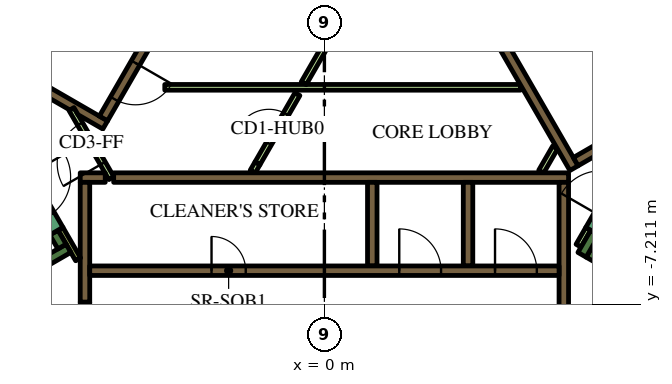
"""IFC4 building model, lengths in metres.
Left out: names, types, materials, properties, quantities, classifications, styles, units other than length and angle.
Written with IfcOpenShell. Run it as: python <this file> out.ifc"""

import sys

from ifc_helpers import new_model, si_unit, direction, frame, frame_2d, origin, place, context, subcontext, project, spatial, polyline, rectangle, outline, extrude, element, fill, save


model = new_model("IFC4")
c1 = context("Model", 3, precision=1e-05, world=origin(), true_north=direction((0.0, 1.0)))
c2 = subcontext(c1, "Body", "Model", "MODEL_VIEW")
j1 = project(units=[si_unit("LENGTHUNIT", "METRE"), si_unit("PLANEANGLEUNIT", "RADIAN")], contexts=[c1])
p1 = place(None, origin())
s1 = spatial("IfcSite", under=j1, at=p1, CompositionType="ELEMENT")
p2 = place(p1, origin())
s2 = spatial("IfcBuilding", under=s1, at=p2, CompositionType="ELEMENT")
p3 = place(p2, frame((0.0, 0.0, 27.6)))
s3 = spatial("IfcBuildingStorey", under=s2, at=p3, CompositionType="ELEMENT", Elevation=27.6)
p4 = place(p3, frame((6.776, 13.364, 0.0), z_axis=(0.0, 0.0, 1.0), x_axis=(0.500004177138, -0.8660229921, 0.0)))
e1 = element("IfcWall", 1, at=p4, inside=s3, PredefinedType="SOLIDWALL", context=c2, shape_type="SweptSolid", body=[
    extrude(rectangle(XDim=20.204, YDim=0.9, at=frame_2d((10.102, 0.0))), origin(), (0.0, 0.0, 1.0), 3.9),
])
p5 = place(p3, frame((-15.36, -1.503, 0.0), z_axis=(0.0, 0.0, 1.0), x_axis=(0.50000389221, 0.866023156604, 0.0)))
e2 = element("IfcWall", 2, at=p5, inside=s3, PredefinedType="SOLIDWALL", context=c2, shape_type="SweptSolid", body=[
    extrude(rectangle(XDim=21.0, YDim=0.9, at=frame_2d((10.5, 0.0))), origin(), (0.0, 0.0, 1.0), 3.9),
])
p6 = place(p3, frame((12.84, -9.261, 0.0), z_axis=(0.0, 0.0, 1.0), x_axis=(-0.866013990052, 0.500019768644, 0.0)))
e3 = element("IfcWall", 3, at=p6, inside=s3, PredefinedType="SOLIDWALL", context=c2, shape_type="SweptSolid", body=[
    extrude(rectangle(XDim=6.8, YDim=0.25, at=frame_2d((3.4, 0.0))), origin(), (0.0, 0.0, 1.0), 3.9),
])
p7 = place(p3, frame((6.78, -5.906, 0.0), z_axis=(0.0, 0.0, 1.0), x_axis=(0.500223362819, 0.865896406789, 0.0)))
e4 = element("IfcWall", 4, at=p7, inside=s3, PredefinedType="SOLIDWALL", context=c2, shape_type="SweptSolid", body=[
    extrude(rectangle(XDim=0.675, YDim=0.25, at=frame_2d((0.337, 0.0))), origin(), (0.0, 0.0, 1.0), 3.9),
])
p8 = place(p3, frame((-12.84, -9.261, 0.0), z_axis=(0.0, 0.0, 1.0), x_axis=(0.866016039709, 0.500016218704, 0.0)))
e5 = element("IfcWall", 5, at=p8, inside=s3, PredefinedType="SOLIDWALL", context=c2, shape_type="SweptSolid", body=[
    extrude(rectangle(XDim=7.05, YDim=0.25, at=frame_2d((3.525, 0.0))), origin(), (0.0, 0.0, 1.0), 3.9),
])
p9 = place(p3, frame((-6.905, -5.69, 0.0), z_axis=(0.0, 0.0, 1.0), x_axis=(-0.500402024738, 0.865793170242, 0.0)))
e6 = element("IfcWall", 6, at=p9, inside=s3, PredefinedType="SOLIDWALL", context=c2, shape_type="SweptSolid", body=[
    extrude(rectangle(XDim=0.425, YDim=0.25, at=frame_2d((0.212, 0.0))), origin(), (0.0, 0.0, 1.0), 3.9),
])
p10 = place(p3, frame((-5.545, -3.875, 0.0), z_axis=(0.0, 0.0, 1.0), x_axis=(1.0, 0.0, 0.0)))
e7 = element("IfcWall", 7, at=p10, inside=s3, PredefinedType="SOLIDWALL", context=c2, shape_type="SweptSolid", body=[
    extrude(rectangle(XDim=11.97, YDim=0.25, at=frame_2d((5.985, 0.0))), origin(), (0.0, 0.0, 1.0), 3.9),
])
p11 = place(p3, frame((-6.425, -3.875, 0.0), z_axis=(0.0, 0.0, 1.0), x_axis=(1.0, 0.0, 0.0)))
e8 = element("IfcWall", 8, at=p11, inside=s3, PredefinedType="SOLIDWALL", context=c2, shape_type="SweptSolid", body=[
    extrude(rectangle(XDim=0.658, YDim=0.25, at=frame_2d((0.329, 0.0))), origin(), (0.0, 0.0, 1.0), 3.9),
])
p12 = place(p3, frame((6.3, -7.268, 0.0), z_axis=(0.0, 0.0, 1.0), x_axis=(0.0, 1.0, 0.0)))
e9 = element("IfcWall", 9, at=p12, inside=s3, PredefinedType="SOLIDWALL", context=c2, shape_type="SweptSolid", body=[
    extrude(rectangle(XDim=3.268, YDim=0.25, at=frame_2d((1.634, 0.0))), origin(), (0.0, 0.0, 1.0), 3.9),
])
for number, where, z_axis, x_axis in (
    (10, (3.78, -4.0, 0.0), (0.0, 0.0, 1.0), (0.0, -1.0, 0.0)),
    (11, (1.26, -4.0, 0.0), (0.0, 0.0, 1.0), (0.0, -1.0, 0.0)),
):
    element("IfcWall", number, at=place(p3, frame(where, z_axis=z_axis, x_axis=x_axis)), inside=s3, PredefinedType="SOLIDWALL", context=c2, shape_type="SweptSolid", body=[
        extrude(rectangle(XDim=2.2, YDim=0.25, at=frame_2d((1.1, 0.0))), origin(), (0.0, 0.0, 1.0), 3.9),
    ])
p13 = place(p3, frame((-6.3, -4.0, 0.0), z_axis=(0.0, 0.0, 1.0), x_axis=(0.0, -1.0, 0.0)))
e12 = element("IfcWall", 12, at=p13, inside=s3, PredefinedType="SOLIDWALL", context=c2, shape_type="SweptSolid", body=[
    extrude(rectangle(XDim=3.154, YDim=0.25, at=frame_2d((1.577, 0.0))), origin(), (0.0, 0.0, 1.0), 3.9),
])
p14 = place(p3, origin())
e13 = element("IfcWall", 13, at=p14, inside=s3, PredefinedType="SOLIDWALL", context=c2, shape_type="SweptSolid", body=[
    extrude(outline(polyline([(0.566, 6.725), (0.566, 6.875), (0.566, 6.875), (0.565, 6.875), (0.361, 6.875), (0.035, 7.439), (0.252, 7.564), (0.377, 7.348), (6.552, -3.348), (6.677, -3.564), (6.46, -3.689), (0.448, 6.725), (0.565, 6.725), (0.566, 6.725), (0.566, 6.725)])), origin(), (0.0, 0.0, 1.0), 3.9),
])
p15 = place(p3, frame((6.614, -3.456, 0.0), z_axis=(0.0, 0.0, 1.0), x_axis=(0.866031582473, 0.499989298045, 0.0)))
e14 = element("IfcWall", 14, at=p15, inside=s3, PredefinedType="SOLIDWALL", context=c2, shape_type="SweptSolid", body=[
    extrude(rectangle(XDim=2.455, YDim=0.25, at=frame_2d((1.228, 0.0))), origin(), (0.0, 0.0, 1.0), 3.9),
])
p16 = place(p3, frame((-8.06, -1.311, 0.0), z_axis=(0.0, 0.0, 1.0), x_axis=(0.50000273126, 0.866023826885, 0.0)))
e15 = element("IfcWall", 15, at=p16, inside=s3, PredefinedType="SOLIDWALL", context=c2, shape_type="SweptSolid", body=[
    extrude(rectangle(XDim=10.33, YDim=0.25, at=frame_2d((5.165, 0.0))), origin(), (0.0, 0.0, 1.0), 3.9),
])
e16 = element("IfcWall", 16, at=p14, inside=s3, PredefinedType="SOLIDWALL", context=c2, shape_type="SweptSolid", body=[
    extrude(outline(polyline([(-5.922, -2.257), (-5.922, -2.257), (-5.705, -2.382), (-5.83, -2.598), (-6.483, -2.221), (-6.591, -2.033), (-6.591, -2.033), (-6.7, -2.096), (-7.952, -1.373), (-7.827, -1.156), (-5.922, -2.257)])), origin(), (0.0, 0.0, 1.0), 3.9),
])
p17 = place(p3, frame((-6.48, -6.027, 0.0), z_axis=(0.0, 0.0, 1.0), x_axis=(-0.499927229454, 0.866067413802, 0.0)))
e17 = element("IfcWall", 17, at=p17, inside=s3, PredefinedType="PARTITIONING", context=c2, shape_type="SweptSolid", body=[
    extrude(rectangle(XDim=0.929, YDim=0.15, at=frame_2d((0.464, 0.0))), origin(), (0.0, 0.0, 1.0), 3.9),
])
p18 = place(p3, frame((-1.887, -3.718, 0.0), z_axis=(0.0, 0.0, 1.0), x_axis=(0.500165633897, 0.865929753888, 0.0)))
e18 = element("IfcWall", 18, at=p18, inside=s3, PredefinedType="PARTITIONING", context=c2, shape_type="SweptSolid", body=[
    extrude(rectangle(XDim=0.254, YDim=0.15, at=frame_2d((0.127, 0.0))), origin(), (0.0, 0.0, 1.0), 2.75),
])
p19 = place(p3, frame((6.945, -5.222, 0.0), z_axis=(0.0, 0.0, 1.0), x_axis=(-0.499818422106, -0.866130212453, 0.0)))
e19 = element("IfcWall", 19, at=p19, inside=s3, PredefinedType="PARTITIONING", context=c2, shape_type="SweptSolid", body=[
    extrude(rectangle(XDim=0.514, YDim=0.15, at=frame_2d((0.257, 0.0))), origin(), (0.0, 0.0, 1.0), 2.75),
])
p20 = place(p3, frame((5.705, -3.718, 0.0), z_axis=(0.0, 0.0, 1.0), x_axis=(0.499962090823, 0.866047289552, 0.0)))
e20 = element("IfcWall", 20, at=p20, inside=s3, PredefinedType="PARTITIONING", context=c2, shape_type="SweptSolid", body=[
    extrude(rectangle(XDim=0.735, YDim=0.15, at=frame_2d((0.367, 0.0))), origin(), (0.0, 0.0, 1.0), 2.75),
])
p21 = place(p3, frame((-4.2, -1.5, 0.0), z_axis=(0.0, 0.0, 1.0), x_axis=(1.0, 0.0, 0.0)))
e21 = element("IfcWall", 21, at=p21, inside=s3, PredefinedType="PARTITIONING", context=c2, shape_type="SweptSolid", body=[
    extrude(rectangle(XDim=9.359, YDim=0.15, at=frame_2d((4.68, 0.0))), origin(), (0.0, 0.0, 1.0), 2.75),
])
p22 = place(p3, frame((-0.544, -1.393, 0.0), z_axis=(0.0, 0.0, 1.0), x_axis=(0.499928740635, 0.866066541489, 0.0)))
e22 = element("IfcWall", 22, at=p22, inside=s3, PredefinedType="PARTITIONING", context=c2, shape_type="SweptSolid", body=[
    extrude(rectangle(XDim=1.912, YDim=0.15, at=frame_2d((0.956, 0.0))), origin(), (0.0, 0.0, 1.0), 2.75),
])
p23 = place(p3, frame((-6.175, -6.325, 0.0), z_axis=(0.0, 0.0, 1.0), x_axis=(1.0, 0.0, 0.0)))
e23 = element("IfcWall", 23, at=p23, inside=s3, PredefinedType="SOLIDWALL", context=c2, shape_type="SweptSolid", body=[
    extrude(rectangle(XDim=12.35, YDim=0.25, at=frame_2d((6.175, 0.0))), origin(), (0.0, 0.0, 1.0), 3.9),
])
p24 = place(p23, frame((3.205, 0.0, 0.0)))
e24 = element("IfcOpeningElement", 24, at=p24, cuts=e23, PredefinedType="OPENING", context=c2, shape_type="SweptSolid", body=[
    extrude(rectangle(XDim=0.9, YDim=2.1, at=frame_2d((0.45, 1.05))), frame((0.0, 0.135, 0.0), z_axis=(0.0, -1.0, 0.0), x_axis=(1.0, 0.0, 0.0)), (0.0, 0.0, 1.0), 0.27),
])
p25 = place(p23, frame((8.145, 0.0, 0.0)))
e25 = element("IfcOpeningElement", 25, at=p25, cuts=e23, PredefinedType="OPENING", context=c2, shape_type="SweptSolid", body=[
    extrude(rectangle(XDim=1.1, YDim=2.1, at=frame_2d((0.55, 1.05))), frame((0.0, 0.135, 0.0), z_axis=(0.0, -1.0, 0.0), x_axis=(1.0, 0.0, 0.0)), (0.0, 0.0, 1.0), 0.27),
])
p26 = place(p23, frame((10.665, 0.0, 0.0)))
e26 = element("IfcOpeningElement", 26, at=p26, cuts=e23, PredefinedType="OPENING", context=c2, shape_type="SweptSolid", body=[
    extrude(rectangle(XDim=1.1, YDim=2.1, at=frame_2d((0.55, 1.05))), frame((0.0, 0.135, 0.0), z_axis=(0.0, -1.0, 0.0), x_axis=(1.0, 0.0, 0.0)), (0.0, 0.0, 1.0), 0.27),
])
p27 = place(p3, frame((8.565, -2.185, 0.0), z_axis=(0.0, 0.0, 1.0), x_axis=(-0.499997954832, 0.866026584559, 0.0)))
e27 = element("IfcWall", 27, at=p27, inside=s3, PredefinedType="SOLIDWALL", context=c2, shape_type="SweptSolid", body=[
    extrude(rectangle(XDim=12.35, YDim=0.25, at=frame_2d((6.175, 0.0))), origin(), (0.0, 0.0, 1.0), 3.9),
])
p28 = place(p27, frame((5.725, 0.0, 0.0)))
e28 = element("IfcOpeningElement", 28, at=p28, cuts=e27, PredefinedType="OPENING", context=c2, shape_type="SweptSolid", body=[
    extrude(rectangle(XDim=0.9, YDim=2.1, at=frame_2d((0.45, 1.05))), frame((0.0, 0.135, 0.0), z_axis=(0.0, -1.0, 0.0), x_axis=(1.0, 0.0, 0.0)), (0.0, 0.0, 1.0), 0.27),
])
p29 = place(p3, frame((-0.898, 6.194, 0.0), z_axis=(0.0, 0.0, 1.0), x_axis=(-0.499996202215, -0.866027596426, 0.0)))
e29 = element("IfcWall", 29, at=p29, inside=s3, PredefinedType="SOLIDWALL", context=c2, shape_type="SweptSolid", body=[
    extrude(rectangle(XDim=9.83, YDim=0.25, at=frame_2d((4.915, 0.0))), origin(), (0.0, 0.0, 1.0), 3.9),
])
p30 = place(p29, frame((0.585, 0.0, 0.0)))
e30 = element("IfcOpeningElement", 30, at=p30, cuts=e29, PredefinedType="OPENING", context=c2, shape_type="SweptSolid", body=[
    extrude(rectangle(XDim=1.1, YDim=2.1, at=frame_2d((0.55, 1.05))), frame((0.0, 0.135, 0.0), z_axis=(0.0, -1.0, 0.0), x_axis=(1.0, 0.0, 0.0)), (0.0, 0.0, 1.0), 0.27),
])
p31 = place(p29, frame((3.105, 0.0, 0.0)))
e31 = element("IfcOpeningElement", 31, at=p31, cuts=e29, PredefinedType="OPENING", context=c2, shape_type="SweptSolid", body=[
    extrude(rectangle(XDim=1.1, YDim=2.1, at=frame_2d((0.55, 1.05))), frame((0.0, 0.135, 0.0), z_axis=(0.0, -1.0, 0.0), x_axis=(1.0, 0.0, 0.0)), (0.0, 0.0, 1.0), 0.27),
])
p32 = place(p29, frame((5.625, 0.0, 0.0)))
e32 = element("IfcOpeningElement", 32, at=p32, cuts=e29, PredefinedType="OPENING", context=c2, shape_type="SweptSolid", body=[
    extrude(rectangle(XDim=1.1, YDim=2.1, at=frame_2d((0.55, 1.05))), frame((0.0, 0.135, 0.0), z_axis=(0.0, -1.0, 0.0), x_axis=(1.0, 0.0, 0.0)), (0.0, 0.0, 1.0), 0.27),
])
p33 = place(p29, frame((8.145, 0.0, 0.0)))
e33 = element("IfcOpeningElement", 33, at=p33, cuts=e29, PredefinedType="OPENING", context=c2, shape_type="SweptSolid", body=[
    extrude(rectangle(XDim=1.1, YDim=2.1, at=frame_2d((0.55, 1.05))), frame((0.0, 0.135, 0.0), z_axis=(0.0, -1.0, 0.0), x_axis=(1.0, 0.0, 0.0)), (0.0, 0.0, 1.0), 0.27),
])
p34 = place(p3, frame((7.053, -5.284, 0.0), z_axis=(0.0, 0.0, 1.0), x_axis=(0.500078061341, 0.865980330357, 0.0)))
e34 = element("IfcWall", 34, at=p34, inside=s3, PredefinedType="SOLIDWALL", context=c2, shape_type="SweptSolid", body=[
    extrude(rectangle(XDim=2.1, YDim=0.4, at=frame_2d((1.05, 0.0))), origin(), (0.0, 0.0, 1.0), 3.9),
])
p35 = place(p34, frame((0.45, 0.0, 0.0)))
e35 = element("IfcOpeningElement", 35, at=p35, cuts=e34, PredefinedType="OPENING", context=c2, shape_type="SweptSolid", body=[
    extrude(rectangle(XDim=1.2, YDim=2.1, at=frame_2d((0.6, 1.05))), frame((0.0, 0.21, 0.0), z_axis=(0.0, -1.0, 0.0), x_axis=(1.0, 0.0, 0.0)), (0.0, 0.0, 1.0), 0.42),
])
p36 = place(p3, frame((-8.103, -3.466, 0.0), z_axis=(0.0, 0.0, 1.0), x_axis=(0.500078061341, -0.865980330357, 0.0)))
e36 = element("IfcWall", 36, at=p36, inside=s3, PredefinedType="SOLIDWALL", context=c2, shape_type="SweptSolid", body=[
    extrude(rectangle(XDim=2.1, YDim=0.4, at=frame_2d((1.05, 0.0))), origin(), (0.0, 0.0, 1.0), 3.9),
])
p37 = place(p36, frame((0.45, 0.0, 0.0)))
e37 = element("IfcOpeningElement", 37, at=p37, cuts=e36, PredefinedType="OPENING", context=c2, shape_type="SweptSolid", body=[
    extrude(rectangle(XDim=1.2, YDim=2.1, at=frame_2d((0.6, 1.05))), frame((0.0, 0.21, 0.0), z_axis=(0.0, -1.0, 0.0), x_axis=(1.0, 0.0, 0.0)), (0.0, 0.0, 1.0), 0.42),
])
p38 = place(p3, frame((-6.3, -7.154, 0.0), z_axis=(0.0, 0.0, 1.0), x_axis=(0.0, -1.0, 0.0)))
e38 = element("IfcWall", 38, at=p38, inside=s3, PredefinedType="SOLIDWALL", context=c2, shape_type="SweptSolid", body=[
    extrude(rectangle(XDim=1.8, YDim=0.25, at=frame_2d((0.9, 0.0))), origin(), (0.0, 0.0, 1.0), 3.9),
])
p39 = place(p38, frame((0.45, 0.0, 0.0)))
e39 = element("IfcOpeningElement", 39, at=p39, cuts=e38, PredefinedType="OPENING", context=c2, shape_type="SweptSolid", body=[
    extrude(rectangle(XDim=0.9, YDim=2.1, at=frame_2d((0.45, 1.05))), frame((0.0, 0.135, 0.0), z_axis=(0.0, -1.0, 0.0), x_axis=(1.0, 0.0, 0.0)), (0.0, 0.0, 1.0), 0.27),
])
p40 = place(p3, frame((-1.76, -3.498, 0.0), z_axis=(0.0, 0.0, 1.0), x_axis=(0.499977374825, 0.866038466041, 0.0)))
e40 = element("IfcWall", 40, at=p40, inside=s3, PredefinedType="PARTITIONING", context=c2, shape_type="SweptSolid", body=[
    extrude(rectangle(XDim=2.1, YDim=0.15, at=frame_2d((1.05, 0.0))), origin(), (0.0, 0.0, 1.0), 2.75),
])
p41 = place(p40, frame((0.6, 0.0, 0.0)))
e41 = element("IfcOpeningElement", 41, at=p41, cuts=e40, PredefinedType="OPENING", context=c2, shape_type="SweptSolid", body=[
    extrude(rectangle(XDim=0.9, YDim=2.1, at=frame_2d((0.45, 1.05))), frame((0.0, 0.085, 0.0), z_axis=(0.0, -1.0, 0.0), x_axis=(1.0, 0.0, 0.0)), (0.0, 0.0, 1.0), 0.17),
])
p42 = place(p3, frame((-5.606, -3.89, 0.0), z_axis=(0.0, 0.0, 1.0), x_axis=(-0.500027713859, 0.866009402589, 0.0)))
e42 = element("IfcWall", 42, at=p42, inside=s3, PredefinedType="PARTITIONING", context=c2, shape_type="SweptSolid", body=[
    extrude(rectangle(XDim=2.1, YDim=0.15, at=frame_2d((1.05, 0.0))), origin(), (0.0, 0.0, 1.0), 2.75),
])
p43 = place(p42, frame((0.45, 0.0, 0.0)))
e43 = element("IfcOpeningElement", 43, at=p43, cuts=e42, PredefinedType="OPENING", context=c2, shape_type="SweptSolid", body=[
    extrude(rectangle(XDim=1.2, YDim=2.1, at=frame_2d((0.6, 1.05))), frame((0.0, 0.085, 0.0), z_axis=(0.0, -1.0, 0.0), x_axis=(1.0, 0.0, 0.0)), (0.0, 0.0, 1.0), 0.17),
])
p44 = place(p3, frame((6.163, 18.475, 0.0), z_axis=(0.0, 0.0, 1.0), x_axis=(0.500001317485, -0.866024643133, 0.0)))
e44 = element("IfcWall", 44, at=p44, inside=s3, PredefinedType="PARTITIONING", context=c2, shape_type="SweptSolid", body=[
    extrude(rectangle(XDim=25.767, YDim=0.15, at=frame_2d((12.883, 0.0))), origin(), (0.0, 0.0, 1.0), 2.75),
])
p45 = place(p44, frame((24.586, 0.0, 0.0)))
e45 = element("IfcOpeningElement", 45, at=p45, cuts=e44, PredefinedType="OPENING", context=c2, shape_type="SweptSolid", body=[
    extrude(rectangle(XDim=1.0, YDim=2.1, at=frame_2d((0.5, 1.05))), frame((0.0, 0.085, 0.0), z_axis=(0.0, -1.0, 0.0), x_axis=(1.0, 0.0, 0.0)), (0.0, 0.0, 1.0), 0.17),
])
p46 = place(p44, frame((19.319, 0.0, 0.0)))
e46 = element("IfcOpeningElement", 46, at=p46, cuts=e44, PredefinedType="OPENING", context=c2, shape_type="SweptSolid", body=[
    extrude(rectangle(XDim=1.0, YDim=2.1, at=frame_2d((0.5, 1.05))), frame((0.0, 0.085, 0.0), z_axis=(0.0, -1.0, 0.0), x_axis=(1.0, 0.0, 0.0)), (0.0, 0.0, 1.0), 0.17),
])
p47 = place(p44, frame((18.012, 0.0, 0.0)))
e47 = element("IfcOpeningElement", 47, at=p47, cuts=e44, PredefinedType="OPENING", context=c2, shape_type="SweptSolid", body=[
    extrude(rectangle(XDim=1.0, YDim=2.1, at=frame_2d((0.5, 1.05))), frame((0.0, 0.085, 0.0), z_axis=(0.0, -1.0, 0.0), x_axis=(1.0, 0.0, 0.0)), (0.0, 0.0, 1.0), 0.17),
])
p48 = place(p44, frame((6.824, 0.0, 0.0)))
e48 = element("IfcOpeningElement", 48, at=p48, cuts=e44, PredefinedType="OPENING", context=c2, shape_type="SweptSolid", body=[
    extrude(rectangle(XDim=1.1, YDim=2.1, at=frame_2d((0.55, 1.05))), frame((0.0, 0.085, 0.0), z_axis=(0.0, -1.0, 0.0), x_axis=(1.0, 0.0, 0.0)), (0.0, 0.0, 1.0), 0.17),
])
p49 = place(p44, frame((4.658, 0.0, 0.0)))
e49 = element("IfcOpeningElement", 49, at=p49, cuts=e44, PredefinedType="OPENING", context=c2, shape_type="SweptSolid", body=[
    extrude(rectangle(XDim=0.9, YDim=2.1, at=frame_2d((0.45, 1.05))), frame((0.0, 0.085, 0.0), z_axis=(0.0, -1.0, 0.0), x_axis=(1.0, 0.0, 0.0)), (0.0, 0.0, 1.0), 0.17),
])
p50 = place(p44, frame((0.18, 0.0, 0.0)))
e50 = element("IfcOpeningElement", 50, at=p50, cuts=e44, PredefinedType="OPENING", context=c2, shape_type="SweptSolid", body=[
    extrude(rectangle(XDim=1.0, YDim=2.1, at=frame_2d((0.5, 1.05))), frame((0.0, 0.085, 0.0), z_axis=(0.0, -1.0, 0.0), x_axis=(1.0, 0.0, 0.0)), (0.0, 0.0, 1.0), 0.17),
])
p51 = place(p3, frame((-19.081, -3.9, 0.0), z_axis=(0.0, 0.0, 1.0), x_axis=(0.499998313975, 0.866026377209, 0.0)))
e51 = element("IfcWall", 51, at=p51, inside=s3, PredefinedType="PARTITIONING", context=c2, shape_type="SweptSolid", body=[
    extrude(rectangle(XDim=25.766, YDim=0.15, at=frame_2d((12.883, 0.0))), origin(), (0.0, 0.0, 1.0), 2.75),
])
p52 = place(p51, frame((24.586, 0.0, 0.0)))
e52 = element("IfcOpeningElement", 52, at=p52, cuts=e51, PredefinedType="OPENING", context=c2, shape_type="SweptSolid", body=[
    extrude(rectangle(XDim=1.0, YDim=2.1, at=frame_2d((0.5, 1.05))), frame((0.0, 0.085, 0.0), z_axis=(0.0, -1.0, 0.0), x_axis=(1.0, 0.0, 0.0)), (0.0, 0.0, 1.0), 0.17),
])
p53 = place(p51, frame((16.196, 0.0, 0.0)))
e53 = element("IfcOpeningElement", 53, at=p53, cuts=e51, PredefinedType="OPENING", context=c2, shape_type="SweptSolid", body=[
    extrude(rectangle(XDim=1.0, YDim=2.1, at=frame_2d((0.5, 1.05))), frame((0.0, 0.085, 0.0), z_axis=(0.0, -1.0, 0.0), x_axis=(1.0, 0.0, 0.0)), (0.0, 0.0, 1.0), 0.17),
])
p54 = place(p51, frame((14.789, 0.0, 0.0)))
e54 = element("IfcOpeningElement", 54, at=p54, cuts=e51, PredefinedType="OPENING", context=c2, shape_type="SweptSolid", body=[
    extrude(rectangle(XDim=1.1, YDim=2.1, at=frame_2d((0.55, 1.05))), frame((0.0, 0.085, 0.0), z_axis=(0.0, -1.0, 0.0), x_axis=(1.0, 0.0, 0.0)), (0.0, 0.0, 1.0), 0.17),
])
p55 = place(p51, frame((3.698, 0.0, 0.0)))
e55 = element("IfcOpeningElement", 55, at=p55, cuts=e51, PredefinedType="OPENING", context=c2, shape_type="SweptSolid", body=[
    extrude(rectangle(XDim=1.0, YDim=2.1, at=frame_2d((0.5, 1.05))), frame((0.0, 0.085, 0.0), z_axis=(0.0, -1.0, 0.0), x_axis=(1.0, 0.0, 0.0)), (0.0, 0.0, 1.0), 0.17),
])
p56 = place(p51, frame((1.531, 0.0, 0.0)))
e56 = element("IfcOpeningElement", 56, at=p56, cuts=e51, PredefinedType="OPENING", context=c2, shape_type="SweptSolid", body=[
    extrude(rectangle(XDim=0.9, YDim=2.1, at=frame_2d((0.45, 1.05))), frame((0.0, 0.085, 0.0), z_axis=(0.0, -1.0, 0.0), x_axis=(1.0, 0.0, 0.0)), (0.0, 0.0, 1.0), 0.17),
])
p57 = place(p24, origin())
e57 = element("IfcDoor", 57, at=p57, inside=s3, OperationType="SINGLE_SWING_LEFT", PredefinedType="DOOR", context=c2, shape_type="SweptSolid", body=[
    extrude(rectangle(XDim=0.9, YDim=2.1, at=frame_2d((0.45, 1.05))), frame((0.0, 0.025, 0.0), z_axis=(0.0, -1.0, 0.0), x_axis=(1.0, 0.0, 0.0)), (0.0, 0.0, 1.0), 0.05),
])
fill(e24, e57)
p58 = place(p25, origin())
e58 = element("IfcDoor", 58, at=p58, inside=s3, OperationType="DOUBLE_DOOR_SLIDING", PredefinedType="DOOR", context=c2, shape_type="SweptSolid", body=[
    extrude(rectangle(XDim=1.1, YDim=2.1, at=frame_2d((0.55, 1.05))), frame((0.0, 0.025, 0.0), z_axis=(0.0, -1.0, 0.0), x_axis=(1.0, 0.0, 0.0)), (0.0, 0.0, 1.0), 0.05),
])
fill(e25, e58)
p59 = place(p26, origin())
e59 = element("IfcDoor", 59, at=p59, inside=s3, OperationType="DOUBLE_DOOR_SLIDING", PredefinedType="DOOR", context=c2, shape_type="SweptSolid", body=[
    extrude(rectangle(XDim=1.1, YDim=2.1, at=frame_2d((0.55, 1.05))), frame((0.0, 0.025, 0.0), z_axis=(0.0, -1.0, 0.0), x_axis=(1.0, 0.0, 0.0)), (0.0, 0.0, 1.0), 0.05),
])
fill(e26, e59)
p60 = place(p33, origin())
e60 = element("IfcDoor", 60, at=p60, inside=s3, OperationType="DOUBLE_DOOR_SLIDING", PredefinedType="DOOR", context=c2, shape_type="SweptSolid", body=[
    extrude(rectangle(XDim=1.1, YDim=2.1, at=frame_2d((0.55, 1.05))), frame((0.0, 0.025, 0.0), z_axis=(0.0, -1.0, 0.0), x_axis=(1.0, 0.0, 0.0)), (0.0, 0.0, 1.0), 0.05),
])
fill(e33, e60)
p61 = place(p41, origin())
e61 = element("IfcDoor", 61, at=p61, inside=s3, OperationType="SINGLE_SWING_LEFT", PredefinedType="DOOR", context=c2, shape_type="SweptSolid", body=[
    extrude(rectangle(XDim=0.9, YDim=2.1, at=frame_2d((0.45, 1.05))), frame((0.0, 0.025, 0.0), z_axis=(0.0, -1.0, 0.0), x_axis=(1.0, 0.0, 0.0)), (0.0, 0.0, 1.0), 0.05),
])
fill(e41, e61)
p62 = place(p43, origin())
e62 = element("IfcDoor", 62, at=p62, inside=s3, OperationType="SINGLE_SWING_LEFT", PredefinedType="DOOR", context=c2, shape_type="SweptSolid", body=[
    extrude(rectangle(XDim=1.2, YDim=2.1, at=frame_2d((0.6, 1.05))), frame((0.0, 0.025, 0.0), z_axis=(0.0, -1.0, 0.0), x_axis=(1.0, 0.0, 0.0)), (0.0, 0.0, 1.0), 0.05),
])
fill(e43, e62)
save(model, sys.argv[1])
